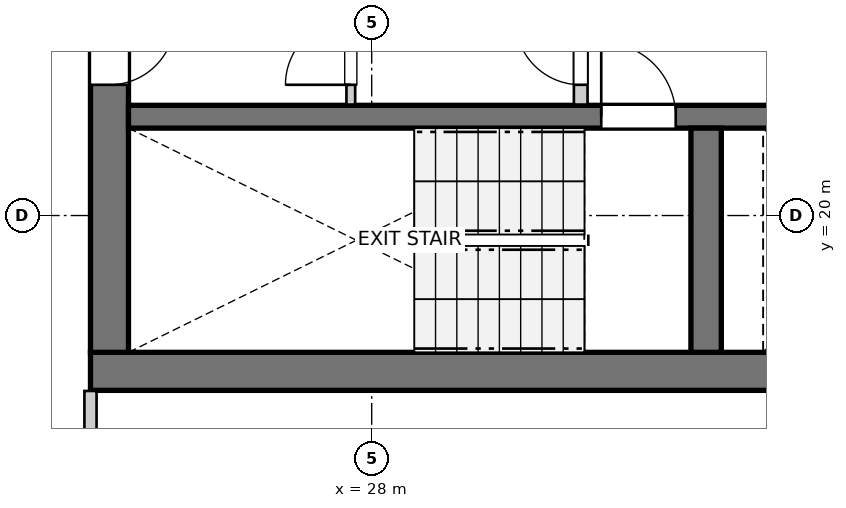
"""IFC4 building model, lengths in metres.
Left out: names, types, materials, properties, quantities, classifications, styles, units other than length and angle.
Written with IfcOpenShell. Run it as: python <this file> out.ifc"""

import sys

from ifc_helpers import new_model, si_unit, direction, frame, frame_2d, origin, place, context, subcontext, project, spatial, rectangle, extrude, source, transform, mapped, element, fill, save


model = new_model("IFC4")
c1 = context("Model", 3, precision=1e-05, world=origin(), true_north=direction((0.0, 1.0)))
c2 = subcontext(c1, "Body", "Model", "MODEL_VIEW")
j1 = project(units=[si_unit("LENGTHUNIT", "METRE"), si_unit("PLANEANGLEUNIT", "RADIAN")], contexts=[c1])
p1 = place(None, origin())
s1 = spatial("IfcSite", under=j1, at=p1, CompositionType="ELEMENT")
p2 = place(p1, origin())
s2 = spatial("IfcBuilding", under=s1, at=p2, CompositionType="ELEMENT")
p3 = place(p2, frame((0.0, 0.0, 234.0)))
s3 = spatial("IfcBuildingStorey", under=s2, at=p3, CompositionType="ELEMENT", Elevation=234.0)
p4 = place(p3, frame((24.3, 17.95, 0.0), z_axis=(0.0, 0.0, 1.0), x_axis=(1.0, 0.0, 0.0)))
e1 = element("IfcWall", 1, at=p4, inside=s3, PredefinedType="SHEAR", context=c2, shape_type="SweptSolid", body=[
    extrude(rectangle(XDim=12.1, YDim=0.5, at=frame_2d((6.05, 0.0))), origin(), (0.0, 0.0, 1.0), 2.96),
])
p5 = place(p3, frame((24.55, 33.8, 0.0), z_axis=(0.0, 0.0, 1.0), x_axis=(0.0, -1.0, 0.0)))
e2 = element("IfcWall", 2, at=p5, inside=s3, PredefinedType="SHEAR", context=c2, shape_type="SweptSolid", body=[
    extrude(rectangle(XDim=15.6, YDim=0.5, at=frame_2d((7.8, 0.0))), origin(), (0.0, 0.0, 1.0), 2.96),
])
p6 = place(p5, frame((7.05, 0.0, 0.0)))
e3 = element("IfcOpeningElement", 3, at=p6, cuts=e2, PredefinedType="OPENING", context=c2, shape_type="SweptSolid", body=[
    extrude(rectangle(XDim=1.5, YDim=2.15, at=frame_2d((0.75, 1.075))), frame((0.0, 0.26, 0.0), z_axis=(0.0, -1.0, 0.0), x_axis=(1.0, 0.0, 0.0)), (0.0, 0.0, 1.0), 0.52),
])
p7 = place(p5, frame((3.52, 0.0, 0.0)))
e4 = element("IfcOpeningElement", 4, at=p7, cuts=e2, PredefinedType="OPENING", context=c2, shape_type="SweptSolid", body=[
    extrude(rectangle(XDim=0.86, YDim=2.05, at=frame_2d((0.43, 1.025))), frame((0.0, 0.26, 0.0), z_axis=(0.0, -1.0, 0.0), x_axis=(1.0, 0.0, 0.0)), (0.0, 0.0, 1.0), 0.52),
])
p8 = place(p5, frame((11.22, 0.0, 0.0)))
e5 = element("IfcOpeningElement", 5, at=p8, cuts=e2, PredefinedType="OPENING", context=c2, shape_type="SweptSolid", body=[
    extrude(rectangle(XDim=0.86, YDim=2.05, at=frame_2d((0.43, 1.025))), frame((0.0, 0.26, 0.0), z_axis=(0.0, -1.0, 0.0), x_axis=(1.0, 0.0, 0.0)), (0.0, 0.0, 1.0), 0.52),
])
p9 = place(p3, frame((24.8, 21.3, 0.0), z_axis=(0.0, 0.0, 1.0), x_axis=(1.0, 0.0, 0.0)))
e6 = element("IfcWall", 6, at=p9, inside=s3, PredefinedType="SHEAR", context=c2, shape_type="SweptSolid", body=[
    extrude(rectangle(XDim=11.1, YDim=0.3, at=frame_2d((5.55, 0.0))), origin(), (0.0, 0.0, 1.0), 2.96),
])
p10 = place(p9, frame((6.22, 0.0, 0.0)))
e7 = element("IfcOpeningElement", 7, at=p10, cuts=e6, PredefinedType="OPENING", context=c2, shape_type="SweptSolid", body=[
    extrude(rectangle(XDim=0.98, YDim=2.15, at=frame_2d((0.49, 1.075))), frame((0.0, 0.16, 0.0), z_axis=(0.0, -1.0, 0.0), x_axis=(1.0, 0.0, 0.0)), (0.0, 0.0, 1.0), 0.32),
])
p11 = place(p9, frame((9.15, 0.0, 0.0)))
e8 = element("IfcOpeningElement", 8, at=p11, cuts=e6, PredefinedType="OPENING", context=c2, shape_type="SweptSolid", body=[
    extrude(rectangle(XDim=1.15, YDim=2.15, at=frame_2d((0.575, 1.075))), frame((0.0, 0.16, 0.0), z_axis=(0.0, -1.0, 0.0), x_axis=(1.0, 0.0, 0.0)), (0.0, 0.0, 1.0), 0.32),
])
p12 = place(p3, frame((32.4, 18.2, 0.0), z_axis=(0.0, 0.0, 1.0), x_axis=(0.0, 1.0, 0.0)))
e9 = element("IfcWall", 9, at=p12, inside=s3, PredefinedType="SHEAR", context=c2, shape_type="SweptSolid", body=[
    extrude(rectangle(XDim=2.95, YDim=0.4, at=frame_2d((1.475, 0.0))), origin(), (0.0, 0.0, 1.0), 2.96),
])
p13 = place(p3, frame((30.75, 21.46, 0.0), z_axis=(0.0, 0.0, 1.0), x_axis=(0.0, 1.0, 0.0)))
e10 = element("IfcWall", 10, at=p13, inside=s3, PredefinedType="PARTITIONING", context=c2, shape_type="SweptSolid", body=[
    extrude(rectangle(XDim=3.11, YDim=0.18, at=frame_2d((1.555, 0.0))), origin(), (0.0, 0.0, 1.0), 2.96),
])
p14 = place(p13, frame((0.26, 0.0, 0.0)))
e11 = element("IfcOpeningElement", 11, at=p14, cuts=e10, PredefinedType="OPENING", context=c2, shape_type="SweptSolid", body=[
    extrude(rectangle(XDim=0.86, YDim=2.05, at=frame_2d((0.43, 1.025))), frame((0.0, 0.1, 0.0), z_axis=(0.0, -1.0, 0.0), x_axis=(1.0, 0.0, 0.0)), (0.0, 0.0, 1.0), 0.2),
])
p15 = place(p3, frame((27.725, 21.46, 0.0), z_axis=(0.0, 0.0, 1.0), x_axis=(0.0, 1.0, 0.0)))
e12 = element("IfcWall", 12, at=p15, inside=s3, PredefinedType="PARTITIONING", context=c2, shape_type="SweptSolid", body=[
    extrude(rectangle(XDim=1.38, YDim=0.115, at=frame_2d((0.69, 0.0))), origin(), (0.0, 0.0, 1.0), 2.96),
])
p16 = place(p15, frame((0.26, 0.0, 0.0)))
e13 = element("IfcOpeningElement", 13, at=p16, cuts=e12, PredefinedType="OPENING", context=c2, shape_type="SweptSolid", body=[
    extrude(rectangle(XDim=0.86, YDim=2.05, at=frame_2d((0.43, 1.025))), frame((0.0, 0.067, 0.0), z_axis=(0.0, -1.0, 0.0), x_axis=(1.0, 0.0, 0.0)), (0.0, 0.0, 1.0), 0.135),
])
p17 = place(p3, frame((24.3, 16.11, 0.0), z_axis=(0.0, 0.0, 1.0), x_axis=(0.0, 1.0, 0.0)))
e14 = element("IfcWall", 14, at=p17, inside=s3, PredefinedType="PARTITIONING", context=c2, shape_type="SweptSolid", body=[
    extrude(rectangle(XDim=1.582, YDim=0.16, at=frame_2d((0.791, 0.0))), origin(), (0.0, 0.0, 1.0), 2.96),
])
m1 = source(origin(), c2, "Body", "SweptSolid", [
    extrude(rectangle(XDim=0.98, YDim=2.15, at=frame_2d((0.49, 1.075))), frame((0.0, 0.025, 0.0), z_axis=(0.0, -1.0, 0.0), x_axis=(1.0, 0.0, 0.0)), (0.0, 0.0, 1.0), 0.05),
])
p18 = place(p10, origin())
e15 = element("IfcDoor", 15, at=p18, inside=s3, OperationType="SINGLE_SWING_LEFT", PredefinedType="DOOR", context=c2, shape_type="MappedRepresentation", body=[
    mapped(m1, transform((0.0, 0.0, 0.0), x_axis=(1.0, 0.0, 0.0), y_axis=(0.0, 1.0, 0.0), z_axis=(0.0, 0.0, 1.0), scale=1.0)),
])
fill(e7, e15)
m2 = source(origin(), c2, "Body", "SweptSolid", [
    extrude(rectangle(XDim=0.86, YDim=2.05, at=frame_2d((0.43, 1.025))), frame((0.0, 0.025, 0.0), z_axis=(0.0, -1.0, 0.0), x_axis=(1.0, 0.0, 0.0)), (0.0, 0.0, 1.0), 0.05),
])
p19 = place(p8, origin())
e16 = element("IfcDoor", 16, at=p19, inside=s3, OperationType="SINGLE_SWING_LEFT", PredefinedType="DOOR", context=c2, shape_type="MappedRepresentation", body=[
    mapped(m2, transform((0.0, 0.0, 0.0), x_axis=(1.0, 0.0, 0.0), y_axis=(0.0, 1.0, 0.0), z_axis=(0.0, 0.0, 1.0), scale=1.0)),
])
fill(e5, e16)
p20 = place(p14, origin())
e17 = element("IfcDoor", 17, at=p20, inside=s3, OperationType="SINGLE_SWING_RIGHT", PredefinedType="DOOR", context=c2, shape_type="MappedRepresentation", body=[
    mapped(m2, transform((0.0, 0.0, 0.0), x_axis=(1.0, 0.0, 0.0), y_axis=(0.0, 1.0, 0.0), z_axis=(0.0, 0.0, 1.0), scale=1.0)),
])
fill(e11, e17)
p21 = place(p16, origin())
e18 = element("IfcDoor", 18, at=p21, inside=s3, OperationType="SINGLE_SWING_LEFT", PredefinedType="DOOR", context=c2, shape_type="MappedRepresentation", body=[
    mapped(m2, transform((0.0, 0.0, 0.0), x_axis=(1.0, 0.0, 0.0), y_axis=(0.0, 1.0, 0.0), z_axis=(0.0, 0.0, 1.0), scale=1.0)),
])
fill(e13, e18)
save(model, sys.argv[1])
